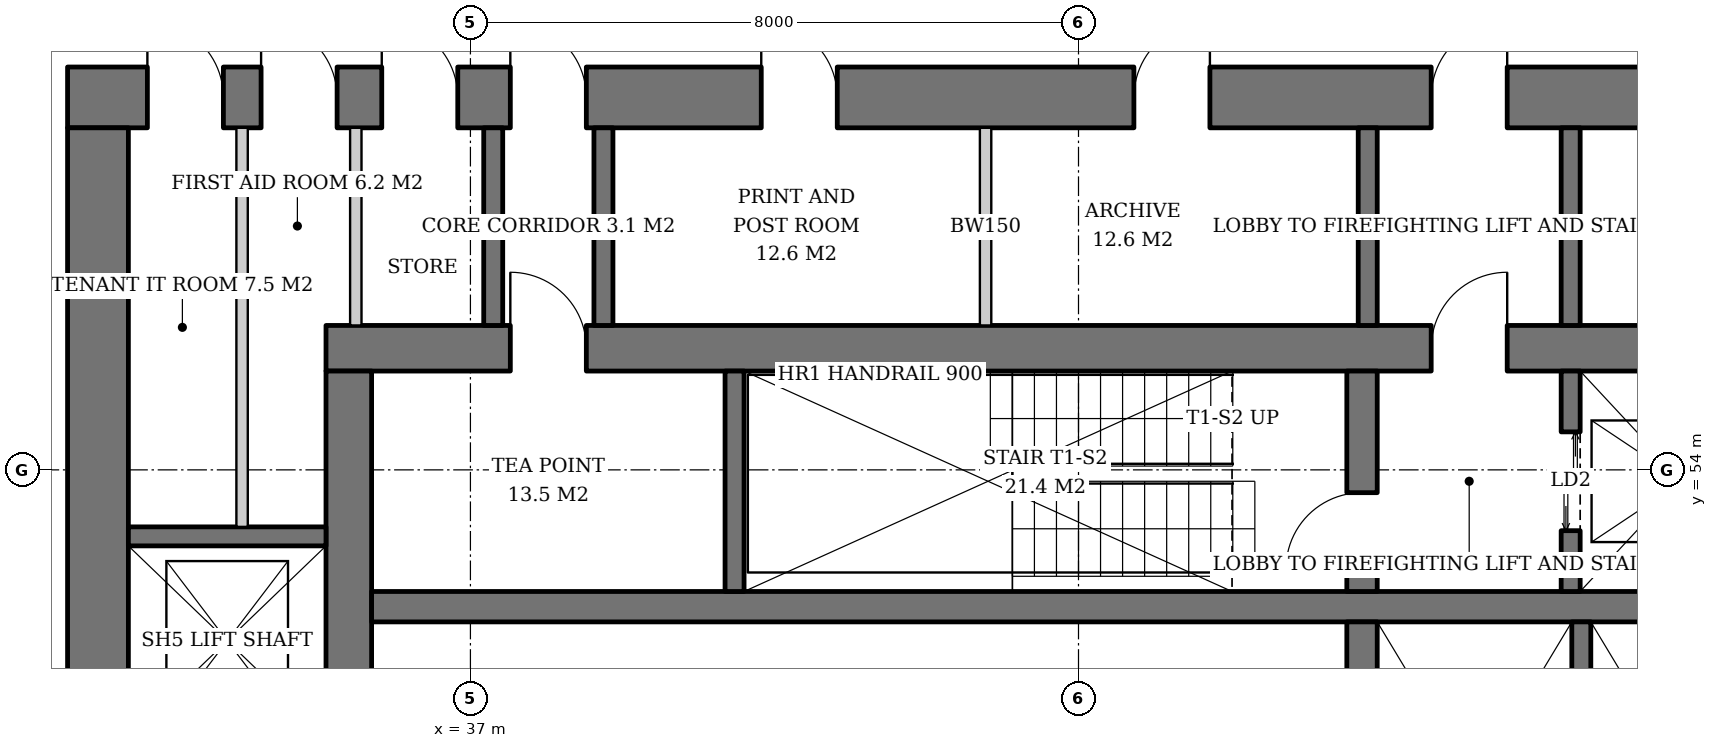
"""IFC4 building model, lengths in metres.
Left out: names, types, materials, properties, quantities, classifications, styles, units other than length and angle.
Written with IfcOpenShell. Run it as: python <this file> out.ifc"""

import sys

from ifc_helpers import new_model, si_unit, direction, frame, frame_2d, origin, place, context, subcontext, project, spatial, rectangle, extrude, element, fill, save


model = new_model("IFC4")
c1 = context("Model", 3, precision=1e-05, world=origin(), true_north=direction((0.0, 1.0)))
c2 = subcontext(c1, "Body", "Model", "MODEL_VIEW")
j1 = project(units=[si_unit("LENGTHUNIT", "METRE"), si_unit("PLANEANGLEUNIT", "RADIAN")], contexts=[c1])
p1 = place(None, origin())
s1 = spatial("IfcSite", under=j1, at=p1, CompositionType="ELEMENT")
p2 = place(p1, origin())
s2 = spatial("IfcBuilding", under=s1, at=p2, CompositionType="ELEMENT")
p3 = place(p2, frame((0.0, 0.0, 55.2)))
s3 = spatial("IfcBuildingStorey", under=s2, at=p3, CompositionType="ELEMENT", Elevation=55.2)
p4 = place(p3, frame((35.1, 55.6, 0.0), z_axis=(0.0, 0.0, 1.0), x_axis=(1.0, 0.0, 0.0)))
e1 = element("IfcWall", 1, at=p4, inside=s3, PredefinedType="SHEAR", context=c2, shape_type="SweptSolid", body=[
    extrude(rectangle(XDim=19.8, YDim=0.6, at=frame_2d((9.9, 0.0))), origin(), (0.0, 0.0, 1.0), 3.8),
])
p5 = place(p4, frame((14.54, 0.0, 0.0)))
e2 = element("IfcOpeningElement", 2, at=p5, cuts=e1, PredefinedType="OPENING", context=c2, shape_type="SweptSolid", body=[
    extrude(rectangle(XDim=1.0, YDim=2.1, at=frame_2d((0.5, 1.05))), frame((0.0, 0.31, 0.0), z_axis=(0.0, -1.0, 0.0), x_axis=(1.0, 0.0, 0.0)), (0.0, 0.0, 1.0), 0.62),
])
p6 = place(p4, frame((2.425, 0.0, 0.0)))
e3 = element("IfcOpeningElement", 3, at=p6, cuts=e1, PredefinedType="OPENING", context=c2, shape_type="SweptSolid", body=[
    extrude(rectangle(XDim=1.0, YDim=2.1, at=frame_2d((0.5, 1.05))), frame((0.0, 0.31, 0.0), z_axis=(0.0, -1.0, 0.0), x_axis=(1.0, 0.0, 0.0)), (0.0, 0.0, 1.0), 0.62),
])
p7 = place(p3, frame((35.4, 36.7, 0.0), z_axis=(0.0, 0.0, 1.0), x_axis=(0.0, 1.0, 0.0)))
e4 = element("IfcWall", 4, at=p7, inside=s3, PredefinedType="SHEAR", context=c2, shape_type="SweptSolid", body=[
    extrude(rectangle(XDim=18.6, YDim=0.6, at=frame_2d((9.3, 0.0))), origin(), (0.0, 0.0, 1.0), 3.8),
])
p8 = place(p7, frame((8.4, 0.0, 0.0)))
e5 = element("IfcOpeningElement", 5, at=p8, cuts=e4, PredefinedType="OPENING", context=c2, shape_type="SweptSolid", body=[
    extrude(rectangle(XDim=1.8, YDim=2.4, at=frame_2d((0.9, 1.2))), frame((0.0, 0.31, 0.0), z_axis=(0.0, -1.0, 0.0), x_axis=(1.0, 0.0, 0.0)), (0.0, 0.0, 1.0), 0.62),
])
p9 = place(p3, frame((31.7, 58.9, 0.0), z_axis=(0.0, 0.0, 1.0), x_axis=(1.0, 0.0, 0.0)))
e6 = element("IfcWall", 6, at=p9, inside=s3, PredefinedType="SHEAR", context=c2, shape_type="SweptSolid", body=[
    extrude(rectangle(XDim=26.6, YDim=0.8, at=frame_2d((13.3, 0.0))), origin(), (0.0, 0.0, 1.0), 3.8),
])
p10 = place(p9, frame((17.94, 0.0, 0.0)))
e7 = element("IfcOpeningElement", 7, at=p10, cuts=e6, PredefinedType="OPENING", context=c2, shape_type="SweptSolid", body=[
    extrude(rectangle(XDim=1.0, YDim=2.1, at=frame_2d((0.5, 1.05))), frame((0.0, 0.41, 0.0), z_axis=(0.0, -1.0, 0.0), x_axis=(1.0, 0.0, 0.0)), (0.0, 0.0, 1.0), 0.82),
])
p11 = place(p9, frame((5.825, 0.0, 0.0)))
e8 = element("IfcOpeningElement", 8, at=p11, cuts=e6, PredefinedType="OPENING", context=c2, shape_type="SweptSolid", body=[
    extrude(rectangle(XDim=1.0, YDim=2.1, at=frame_2d((0.5, 1.05))), frame((0.0, 0.41, 0.0), z_axis=(0.0, -1.0, 0.0), x_axis=(1.0, 0.0, 0.0)), (0.0, 0.0, 1.0), 0.82),
])
p12 = place(p9, frame((1.05, 0.0, 0.0)))
e9 = element("IfcOpeningElement", 9, at=p12, cuts=e6, PredefinedType="OPENING", context=c2, shape_type="SweptSolid", body=[
    extrude(rectangle(XDim=1.0, YDim=2.1, at=frame_2d((0.5, 1.05))), frame((0.0, 0.41, 0.0), z_axis=(0.0, -1.0, 0.0), x_axis=(1.0, 0.0, 0.0)), (0.0, 0.0, 1.0), 0.82),
])
p13 = place(p9, frame((2.546, 0.0, 0.0)))
e10 = element("IfcOpeningElement", 10, at=p13, cuts=e6, PredefinedType="OPENING", context=c2, shape_type="SweptSolid", body=[
    extrude(rectangle(XDim=1.0, YDim=2.1, at=frame_2d((0.5, 1.05))), frame((0.0, 0.41, 0.0), z_axis=(0.0, -1.0, 0.0), x_axis=(1.0, 0.0, 0.0)), (0.0, 0.0, 1.0), 0.82),
])
p14 = place(p9, frame((4.134, 0.0, 0.0)))
e11 = element("IfcOpeningElement", 11, at=p14, cuts=e6, PredefinedType="OPENING", context=c2, shape_type="SweptSolid", body=[
    extrude(rectangle(XDim=1.0, YDim=2.1, at=frame_2d((0.5, 1.05))), frame((0.0, 0.41, 0.0), z_axis=(0.0, -1.0, 0.0), x_axis=(1.0, 0.0, 0.0)), (0.0, 0.0, 1.0), 0.82),
])
p15 = place(p9, frame((9.126, 0.0, 0.0)))
e12 = element("IfcOpeningElement", 12, at=p15, cuts=e6, PredefinedType="OPENING", context=c2, shape_type="SweptSolid", body=[
    extrude(rectangle(XDim=1.0, YDim=2.1, at=frame_2d((0.5, 1.05))), frame((0.0, 0.41, 0.0), z_axis=(0.0, -1.0, 0.0), x_axis=(1.0, 0.0, 0.0)), (0.0, 0.0, 1.0), 0.82),
])
p16 = place(p9, frame((14.029, 0.0, 0.0)))
e13 = element("IfcOpeningElement", 13, at=p16, cuts=e6, PredefinedType="OPENING", context=c2, shape_type="SweptSolid", body=[
    extrude(rectangle(XDim=1.0, YDim=2.1, at=frame_2d((0.5, 1.05))), frame((0.0, 0.41, 0.0), z_axis=(0.0, -1.0, 0.0), x_axis=(1.0, 0.0, 0.0)), (0.0, 0.0, 1.0), 0.82),
])
p17 = place(p9, frame((22.35, 0.0, 0.0)))
e14 = element("IfcOpeningElement", 14, at=p17, cuts=e6, PredefinedType="OPENING", context=c2, shape_type="SweptSolid", body=[
    extrude(rectangle(XDim=1.0, YDim=2.1, at=frame_2d((0.5, 1.05))), frame((0.0, 0.41, 0.0), z_axis=(0.0, -1.0, 0.0), x_axis=(1.0, 0.0, 0.0)), (0.0, 0.0, 1.0), 0.82),
])
p18 = place(p3, frame((32.1, 33.5, 0.0), z_axis=(0.0, 0.0, 1.0), x_axis=(0.0, 1.0, 0.0)))
e15 = element("IfcWall", 15, at=p18, inside=s3, PredefinedType="SHEAR", context=c2, shape_type="SweptSolid", body=[
    extrude(rectangle(XDim=25.0, YDim=0.8, at=frame_2d((12.5, 0.0))), origin(), (0.0, 0.0, 1.0), 3.8),
])
p19 = place(p18, frame((11.6, 0.0, 0.0)))
e16 = element("IfcOpeningElement", 16, at=p19, cuts=e15, PredefinedType="OPENING", context=c2, shape_type="SweptSolid", body=[
    extrude(rectangle(XDim=1.8, YDim=2.4, at=frame_2d((0.9, 1.2))), frame((0.0, 0.41, 0.0), z_axis=(0.0, -1.0, 0.0), x_axis=(1.0, 0.0, 0.0)), (0.0, 0.0, 1.0), 0.82),
])
p20 = place(p3, frame((35.7, 52.2, 0.0), z_axis=(0.0, 0.0, 1.0), x_axis=(1.0, 0.0, 0.0)))
e17 = element("IfcWall", 17, at=p20, inside=s3, PredefinedType="SHEAR", context=c2, shape_type="SweptSolid", body=[
    extrude(rectangle(XDim=18.6, YDim=0.4, at=frame_2d((9.3, 0.0))), origin(), (0.0, 0.0, 1.0), 3.8),
])
p21 = place(p3, frame((48.73, 40.0, 0.0), z_axis=(0.0, 0.0, 1.0), x_axis=(0.0, 1.0, 0.0)))
e18 = element("IfcWall", 18, at=p21, inside=s3, PredefinedType="SHEAR", context=c2, shape_type="SweptSolid", body=[
    extrude(rectangle(XDim=12.0, YDim=0.4, at=frame_2d((6.0, 0.0))), origin(), (0.0, 0.0, 1.0), 3.8),
])
p22 = place(p3, frame((48.73, 52.4, 0.0), z_axis=(0.0, 0.0, 1.0), x_axis=(0.0, 1.0, 0.0)))
e19 = element("IfcWall", 19, at=p22, inside=s3, PredefinedType="SHEAR", context=c2, shape_type="SweptSolid", body=[
    extrude(rectangle(XDim=2.9, YDim=0.4, at=frame_2d((1.45, 0.0))), origin(), (0.0, 0.0, 1.0), 3.8),
])
p23 = place(p22, frame((0.3, 0.0, 0.0)))
e20 = element("IfcOpeningElement", 20, at=p23, cuts=e19, PredefinedType="OPENING", context=c2, shape_type="SweptSolid", body=[
    extrude(rectangle(XDim=1.0, YDim=2.1, at=frame_2d((0.5, 1.05))), frame((0.0, 0.21, 0.0), z_axis=(0.0, -1.0, 0.0), x_axis=(1.0, 0.0, 0.0)), (0.0, 0.0, 1.0), 0.42),
])
p24 = place(p3, frame((40.475, 52.4, 0.0), z_axis=(0.0, 0.0, 1.0), x_axis=(0.0, 1.0, 0.0)))
e21 = element("IfcWall", 21, at=p24, inside=s3, PredefinedType="SHEAR", context=c2, shape_type="SweptSolid", body=[
    extrude(rectangle(XDim=2.9, YDim=0.25, at=frame_2d((1.45, 0.0))), origin(), (0.0, 0.0, 1.0), 3.8),
])
p25 = place(p3, frame((51.475, 52.4, 0.0), z_axis=(0.0, 0.0, 1.0), x_axis=(0.0, 1.0, 0.0)))
e22 = element("IfcWall", 22, at=p25, inside=s3, PredefinedType="SHEAR", context=c2, shape_type="SweptSolid", body=[
    extrude(rectangle(XDim=2.9, YDim=0.25, at=frame_2d((1.45, 0.0))), origin(), (0.0, 0.0, 1.0), 3.8),
])
p26 = place(p25, frame((0.8, 0.0, 0.0)))
e23 = element("IfcOpeningElement", 23, at=p26, cuts=e22, PredefinedType="OPENING", context=c2, shape_type="SweptSolid", body=[
    extrude(rectangle(XDim=1.3, YDim=2.2, at=frame_2d((0.65, 1.1))), frame((0.0, 0.135, 0.0), z_axis=(0.0, -1.0, 0.0), x_axis=(1.0, 0.0, 0.0)), (0.0, 0.0, 1.0), 0.27),
])
p27 = place(p3, frame((51.615, 47.75, 0.0), z_axis=(0.0, 0.0, 1.0), x_axis=(0.0, 1.0, 0.0)))
e24 = element("IfcWall", 24, at=p27, inside=s3, PredefinedType="SHEAR", context=c2, shape_type="SweptSolid", body=[
    extrude(rectangle(XDim=4.25, YDim=0.25, at=frame_2d((2.125, 0.0))), origin(), (0.0, 0.0, 1.0), 3.8),
])
p28 = place(p3, frame((32.5, 53.125, 0.0), z_axis=(0.0, 0.0, 1.0), x_axis=(1.0, 0.0, 0.0)))
e25 = element("IfcWall", 25, at=p28, inside=s3, PredefinedType="SHEAR", context=c2, shape_type="SweptSolid", body=[
    extrude(rectangle(XDim=2.6, YDim=0.25, at=frame_2d((1.3, 0.0))), origin(), (0.0, 0.0, 1.0), 3.8),
])
for number, where, z_axis, x_axis in (
    (26, (48.805, 55.9, 0.0), (0.0, 0.0, 1.0), (0.0, 1.0, 0.0)),
    (27, (51.475, 55.9, 0.0), (0.0, 0.0, 1.0), (0.0, 1.0, 0.0)),
    (28, (37.3, 55.9, 0.0), (0.0, 0.0, 1.0), (0.0, 1.0, 0.0)),
    (29, (38.75, 55.9, 0.0), (0.0, 0.0, 1.0), (0.0, 1.0, 0.0)),
):
    element("IfcWall", number, at=place(p3, frame(where, z_axis=z_axis, x_axis=x_axis)), inside=s3, PredefinedType="SOLIDWALL", context=c2, shape_type="SweptSolid", body=[
        extrude(rectangle(XDim=2.6, YDim=0.25, at=frame_2d((1.3, 0.0))), origin(), (0.0, 0.0, 1.0), 3.62),
    ])
p29 = place(p3, frame((33.996, 53.25, 0.0), z_axis=(0.0, 0.0, 1.0), x_axis=(0.0, 1.0, 0.0)))
e30 = element("IfcWall", 30, at=p29, inside=s3, PredefinedType="SOLIDWALL", context=c2, shape_type="SweptSolid", body=[
    extrude(rectangle(XDim=5.25, YDim=0.15, at=frame_2d((2.625, 0.0))), origin(), (0.0, 0.0, 1.0), 3.62),
])
for number, where, z_axis, x_axis in (
    (31, (35.492, 55.9, 0.0), (0.0, 0.0, 1.0), (0.0, 1.0, 0.0)),
    (32, (43.778, 55.9, 0.0), (0.0, 0.0, 1.0), (0.0, 1.0, 0.0)),
):
    element("IfcWall", number, at=place(p3, frame(where, z_axis=z_axis, x_axis=x_axis)), inside=s3, PredefinedType="SOLIDWALL", context=c2, shape_type="SweptSolid", body=[
        extrude(rectangle(XDim=2.6, YDim=0.15, at=frame_2d((1.3, 0.0))), origin(), (0.0, 0.0, 1.0), 3.62),
    ])
p30 = place(p26, origin())
e33 = element("IfcDoor", 33, at=p30, inside=s3, OperationType="DOUBLE_DOOR_SLIDING", PredefinedType="DOOR", context=c2, shape_type="SweptSolid", body=[
    extrude(rectangle(XDim=1.3, YDim=2.2, at=frame_2d((0.65, 1.1))), frame((0.0, 0.025, 0.0), z_axis=(0.0, -1.0, 0.0), x_axis=(1.0, 0.0, 0.0)), (0.0, 0.0, 1.0), 0.05),
])
fill(e23, e33)
p31 = place(p23, origin())
e34 = element("IfcDoor", 34, at=p31, inside=s3, OperationType="SINGLE_SWING_LEFT", PredefinedType="DOOR", context=c2, shape_type="SweptSolid", body=[
    extrude(rectangle(XDim=1.0, YDim=2.1, at=frame_2d((0.5, 1.05))), frame((0.0, 0.025, 0.0), z_axis=(0.0, -1.0, 0.0), x_axis=(1.0, 0.0, 0.0)), (0.0, 0.0, 1.0), 0.05),
])
fill(e20, e34)
p32 = place(p5, origin())
e35 = element("IfcDoor", 35, at=p32, inside=s3, OperationType="SINGLE_SWING_RIGHT", PredefinedType="DOOR", context=c2, shape_type="SweptSolid", body=[
    extrude(rectangle(XDim=1.0, YDim=2.1, at=frame_2d((0.5, 1.05))), frame((0.0, 0.025, 0.0), z_axis=(0.0, -1.0, 0.0), x_axis=(1.0, 0.0, 0.0)), (0.0, 0.0, 1.0), 0.05),
])
fill(e2, e35)
p33 = place(p10, origin())
e36 = element("IfcDoor", 36, at=p33, inside=s3, OperationType="SINGLE_SWING_RIGHT", PredefinedType="DOOR", context=c2, shape_type="SweptSolid", body=[
    extrude(rectangle(XDim=1.0, YDim=2.1, at=frame_2d((0.5, 1.05))), frame((0.0, 0.025, 0.0), z_axis=(0.0, -1.0, 0.0), x_axis=(1.0, 0.0, 0.0)), (0.0, 0.0, 1.0), 0.05),
])
fill(e7, e36)
p34 = place(p11, origin())
e37 = element("IfcDoor", 37, at=p34, inside=s3, OperationType="SINGLE_SWING_LEFT", PredefinedType="DOOR", context=c2, shape_type="SweptSolid", body=[
    extrude(rectangle(XDim=1.0, YDim=2.1, at=frame_2d((0.5, 1.05))), frame((0.0, 0.025, 0.0), z_axis=(0.0, -1.0, 0.0), x_axis=(1.0, 0.0, 0.0)), (0.0, 0.0, 1.0), 0.05),
])
fill(e8, e37)
p35 = place(p6, origin())
e38 = element("IfcDoor", 38, at=p35, inside=s3, OperationType="SINGLE_SWING_LEFT", PredefinedType="DOOR", context=c2, shape_type="SweptSolid", body=[
    extrude(rectangle(XDim=1.0, YDim=2.1, at=frame_2d((0.5, 1.05))), frame((0.0, -0.24, 0.0), z_axis=(0.0, -1.0, 0.0), x_axis=(1.0, 0.0, 0.0)), (0.0, 0.0, 1.0), 0.05),
])
fill(e3, e38)
p36 = place(p12, origin())
e39 = element("IfcDoor", 39, at=p36, inside=s3, OperationType="SINGLE_SWING_LEFT", PredefinedType="DOOR", context=c2, shape_type="SweptSolid", body=[
    extrude(rectangle(XDim=1.0, YDim=2.1, at=frame_2d((0.5, 1.05))), frame((0.0, -0.34, 0.0), z_axis=(0.0, -1.0, 0.0), x_axis=(1.0, 0.0, 0.0)), (0.0, 0.0, 1.0), 0.05),
])
fill(e9, e39)
p37 = place(p13, origin())
e40 = element("IfcDoor", 40, at=p37, inside=s3, OperationType="SINGLE_SWING_LEFT", PredefinedType="DOOR", context=c2, shape_type="SweptSolid", body=[
    extrude(rectangle(XDim=1.0, YDim=2.1, at=frame_2d((0.5, 1.05))), frame((0.0, -0.34, 0.0), z_axis=(0.0, -1.0, 0.0), x_axis=(1.0, 0.0, 0.0)), (0.0, 0.0, 1.0), 0.05),
])
fill(e10, e40)
p38 = place(p14, origin())
e41 = element("IfcDoor", 41, at=p38, inside=s3, OperationType="SINGLE_SWING_LEFT", PredefinedType="DOOR", context=c2, shape_type="SweptSolid", body=[
    extrude(rectangle(XDim=1.0, YDim=2.1, at=frame_2d((0.5, 1.05))), frame((0.0, -0.34, 0.0), z_axis=(0.0, -1.0, 0.0), x_axis=(1.0, 0.0, 0.0)), (0.0, 0.0, 1.0), 0.05),
])
fill(e11, e41)
p39 = place(p15, origin())
e42 = element("IfcDoor", 42, at=p39, inside=s3, OperationType="SINGLE_SWING_LEFT", PredefinedType="DOOR", context=c2, shape_type="SweptSolid", body=[
    extrude(rectangle(XDim=1.0, YDim=2.1, at=frame_2d((0.5, 1.05))), frame((0.0, -0.34, 0.0), z_axis=(0.0, -1.0, 0.0), x_axis=(1.0, 0.0, 0.0)), (0.0, 0.0, 1.0), 0.05),
])
fill(e12, e42)
p40 = place(p16, origin())
e43 = element("IfcDoor", 43, at=p40, inside=s3, OperationType="SINGLE_SWING_RIGHT", PredefinedType="DOOR", context=c2, shape_type="SweptSolid", body=[
    extrude(rectangle(XDim=1.0, YDim=2.1, at=frame_2d((0.5, 1.05))), frame((0.0, -0.34, 0.0), z_axis=(0.0, -1.0, 0.0), x_axis=(1.0, 0.0, 0.0)), (0.0, 0.0, 1.0), 0.05),
])
fill(e13, e43)
save(model, sys.argv[1])
